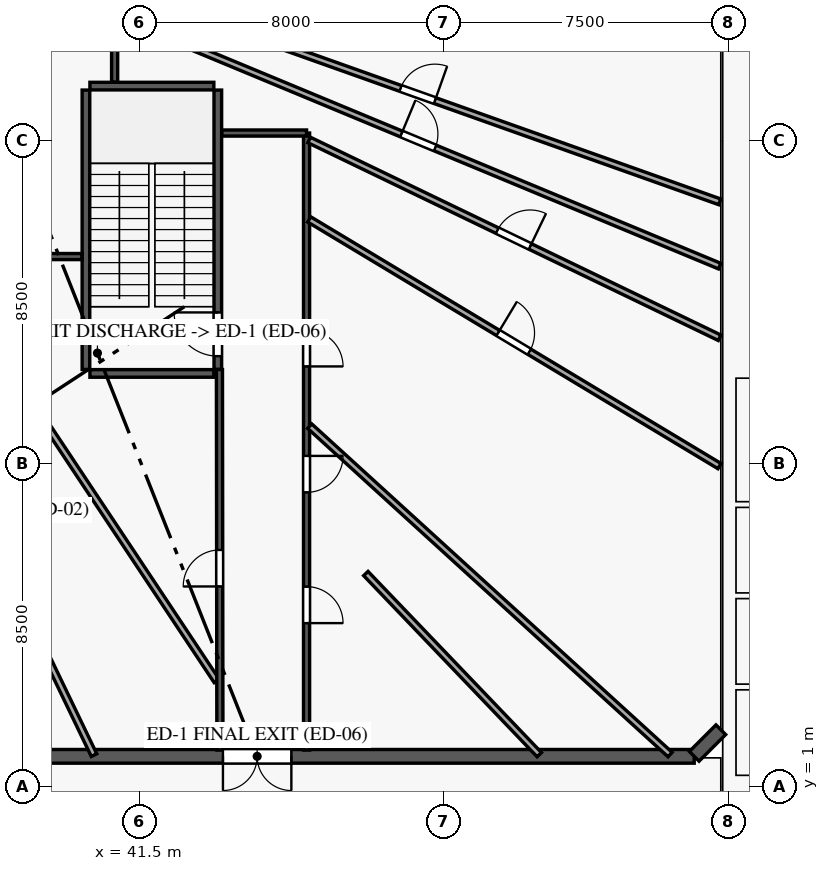
"""IFC4 building model, lengths in metres.
Left out: names, types, materials, properties, quantities, classifications, styles, units other than length and angle.
Written with IfcOpenShell. Run it as: python <this file> out.ifc"""

import sys

from ifc_helpers import new_model, si_unit, direction, frame, frame_2d, origin, origin_with_axes, origin_2d, place, context, subcontext, project, spatial, rectangle, circle, extrude, source, transform, mapped, element, fill, save


model = new_model("IFC4")
c1 = context("Model", 3, precision=1e-05, world=origin(), true_north=direction((0.0, 1.0)))
c2 = subcontext(c1, "Body", "Model", "MODEL_VIEW")
j1 = project(units=[si_unit("LENGTHUNIT", "METRE"), si_unit("PLANEANGLEUNIT", "RADIAN")], contexts=[c1])
p1 = place(None, origin())
s1 = spatial("IfcSite", under=j1, at=p1, CompositionType="ELEMENT")
p2 = place(p1, origin())
s2 = spatial("IfcBuilding", under=s1, at=p2, CompositionType="ELEMENT")
p3 = place(p2, origin())
s3 = spatial("IfcBuildingStorey", under=s2, at=p3, CompositionType="ELEMENT", Elevation=0.0)
m1 = source(origin_with_axes(), c2, "Body", "SweptSolid", [
    extrude(circle(Radius=0.9, at=origin_2d()), origin(), (0.0, 0.0, 1.0), 4.5),
])
p4 = place(p3, frame((46.8, 7.5, 0.0), z_axis=(0.0, 0.0, 1.0), x_axis=(1.0, 0.0, 0.0)))
e1 = element("IfcColumn", 1, at=p4, inside=s3, PredefinedType="COLUMN", context=c2, shape_type="MappedRepresentation", body=[
    mapped(m1, transform((0.0, 0.0, 0.0), scale=1.0)),
])
m2 = source(origin_with_axes(), c2, "Body", "SweptSolid", [
    extrude(rectangle(XDim=0.6, YDim=0.9, at=origin_2d()), origin(), (0.0, 0.0, 1.0), 4.5),
])
for number, where, z_axis, x_axis in (
    (2, (54.8, 10.5, 0.0), (0.0, 0.0, 1.0), (1.0, 0.0, 0.0)),
    (3, (54.8, 18.5, 0.0), (0.0, 0.0, 1.0), (1.0, 0.0, 0.0)),
):
    element("IfcColumn", number, at=place(p3, frame(where, z_axis=z_axis, x_axis=x_axis)), inside=s3, PredefinedType="PILASTER", context=c2, shape_type="MappedRepresentation", body=[
        mapped(m2, transform((0.0, 0.0, 0.0), scale=1.0)),
    ])
p5 = place(p3, frame((56.1, 1.8, 0.0), z_axis=(0.0, 0.0, 1.0), x_axis=(-1.0, 0.0, 0.0)))
e4 = element("IfcWall", 4, at=p5, inside=s3, PredefinedType="SOLIDWALL", context=c2, shape_type="SweptSolid", body=[
    extrude(rectangle(XDim=54.6, YDim=0.36, at=frame_2d((27.3, 0.0))), origin(), (0.0, 0.0, 1.0), 4.2),
])
p6 = place(p5, frame((51.547, 0.0, 0.85)))
e5 = element("IfcOpeningElement", 5, at=p6, cuts=e4, PredefinedType="OPENING", context=c2, shape_type="SweptSolid", body=[
    extrude(rectangle(XDim=1.8, YDim=2.2, at=frame_2d((0.9, 1.1))), frame((0.0, 0.19, 0.0), z_axis=(0.0, -1.0, 0.0), x_axis=(1.0, 0.0, 0.0)), (0.0, 0.0, 1.0), 0.38),
])
p7 = place(p5, frame((47.014, 0.0, 0.85)))
e6 = element("IfcOpeningElement", 6, at=p7, cuts=e4, PredefinedType="OPENING", context=c2, shape_type="SweptSolid", body=[
    extrude(rectangle(XDim=1.8, YDim=2.2, at=frame_2d((0.9, 1.1))), frame((0.0, 0.19, 0.0), z_axis=(0.0, -1.0, 0.0), x_axis=(1.0, 0.0, 0.0)), (0.0, 0.0, 1.0), 0.38),
])
p8 = place(p5, frame((42.49, 0.0, 0.85)))
e7 = element("IfcOpeningElement", 7, at=p8, cuts=e4, PredefinedType="OPENING", context=c2, shape_type="SweptSolid", body=[
    extrude(rectangle(XDim=1.8, YDim=2.2, at=frame_2d((0.9, 1.1))), frame((0.0, 0.19, 0.0), z_axis=(0.0, -1.0, 0.0), x_axis=(1.0, 0.0, 0.0)), (0.0, 0.0, 1.0), 0.38),
])
p9 = place(p5, frame((37.288, 0.0, 0.85)))
e8 = element("IfcOpeningElement", 8, at=p9, cuts=e4, PredefinedType="OPENING", context=c2, shape_type="SweptSolid", body=[
    extrude(rectangle(XDim=1.8, YDim=2.2, at=frame_2d((0.9, 1.1))), frame((0.0, 0.19, 0.0), z_axis=(0.0, -1.0, 0.0), x_axis=(1.0, 0.0, 0.0)), (0.0, 0.0, 1.0), 0.38),
])
p10 = place(p5, frame((25.176, 0.0, 0.85)))
e9 = element("IfcOpeningElement", 9, at=p10, cuts=e4, PredefinedType="OPENING", context=c2, shape_type="SweptSolid", body=[
    extrude(rectangle(XDim=1.8, YDim=2.2, at=frame_2d((0.9, 1.1))), frame((0.0, 0.19, 0.0), z_axis=(0.0, -1.0, 0.0), x_axis=(1.0, 0.0, 0.0)), (0.0, 0.0, 1.0), 0.38),
])
p11 = place(p5, frame((17.162, 0.0, 0.85)))
e10 = element("IfcOpeningElement", 10, at=p11, cuts=e4, PredefinedType="OPENING", context=c2, shape_type="SweptSolid", body=[
    extrude(rectangle(XDim=1.8, YDim=2.2, at=frame_2d((0.9, 1.1))), frame((0.0, 0.19, 0.0), z_axis=(0.0, -1.0, 0.0), x_axis=(1.0, 0.0, 0.0)), (0.0, 0.0, 1.0), 0.38),
])
p12 = place(p5, frame((13.244, 0.0, 0.85)))
e11 = element("IfcOpeningElement", 11, at=p12, cuts=e4, PredefinedType="OPENING", context=c2, shape_type="SweptSolid", body=[
    extrude(rectangle(XDim=1.8, YDim=2.2, at=frame_2d((0.9, 1.1))), frame((0.0, 0.19, 0.0), z_axis=(0.0, -1.0, 0.0), x_axis=(1.0, 0.0, 0.0)), (0.0, 0.0, 1.0), 0.38),
])
p13 = place(p5, frame((6.25, 0.0, 0.85)))
e12 = element("IfcOpeningElement", 12, at=p13, cuts=e4, PredefinedType="OPENING", context=c2, shape_type="SweptSolid", body=[
    extrude(rectangle(XDim=1.8, YDim=2.2, at=frame_2d((0.9, 1.1))), frame((0.0, 0.19, 0.0), z_axis=(0.0, -1.0, 0.0), x_axis=(1.0, 0.0, 0.0)), (0.0, 0.0, 1.0), 0.38),
])
p14 = place(p5, frame((1.48, 0.0, 0.85)))
e13 = element("IfcOpeningElement", 13, at=p14, cuts=e4, PredefinedType="OPENING", context=c2, shape_type="SweptSolid", body=[
    extrude(rectangle(XDim=1.8, YDim=2.2, at=frame_2d((0.9, 1.1))), frame((0.0, 0.19, 0.0), z_axis=(0.0, -1.0, 0.0), x_axis=(1.0, 0.0, 0.0)), (0.0, 0.0, 1.0), 0.38),
])
p15 = place(p5, frame((33.2, 0.0, 0.0)))
e14 = element("IfcOpeningElement", 14, at=p15, cuts=e4, PredefinedType="OPENING", context=c2, shape_type="SweptSolid", body=[
    extrude(rectangle(XDim=1.8, YDim=2.3, at=frame_2d((0.9, 1.15))), frame((0.0, 0.19, 0.0), z_axis=(0.0, -1.0, 0.0), x_axis=(1.0, 0.0, 0.0)), (0.0, 0.0, 1.0), 0.38),
])
p16 = place(p5, frame((30.6, 0.0, 0.0)))
e15 = element("IfcOpeningElement", 15, at=p16, cuts=e4, PredefinedType="OPENING", context=c2, shape_type="SweptSolid", body=[
    extrude(rectangle(XDim=1.8, YDim=2.3, at=frame_2d((0.9, 1.15))), frame((0.0, 0.19, 0.0), z_axis=(0.0, -1.0, 0.0), x_axis=(1.0, 0.0, 0.0)), (0.0, 0.0, 1.0), 0.38),
])
p17 = place(p5, frame((10.6, 0.0, 0.0)))
e16 = element("IfcOpeningElement", 16, at=p17, cuts=e4, PredefinedType="OPENING", context=c2, shape_type="SweptSolid", body=[
    extrude(rectangle(XDim=1.8, YDim=2.3, at=frame_2d((0.9, 1.15))), frame((0.0, 0.19, 0.0), z_axis=(0.0, -1.0, 0.0), x_axis=(1.0, 0.0, 0.0)), (0.0, 0.0, 1.0), 0.38),
])
p18 = place(p3, frame((56.1, 1.8, 0.0), z_axis=(0.0, 0.0, 1.0), x_axis=(0.707106781187, 0.707106781187, 0.0)))
e17 = element("IfcWall", 17, at=p18, inside=s3, PredefinedType="SOLIDWALL", context=c2, shape_type="SweptSolid", body=[
    extrude(rectangle(XDim=0.99, YDim=0.36, at=frame_2d((0.495, 0.0))), origin(), (0.0, 0.0, 1.0), 4.2),
])
p19 = place(p3, frame((40.095, 11.98, 0.0), z_axis=(0.0, 0.0, 1.0), x_axis=(0.0, 1.0, 0.0)))
e18 = element("IfcWall", 18, at=p19, inside=s3, PredefinedType="SHEAR", context=c2, shape_type="SweptSolid", body=[
    extrude(rectangle(XDim=7.35, YDim=0.2, at=frame_2d((3.675, 0.0))), origin(), (0.0, 0.0, 1.0), 4.2),
])
p20 = place(p3, frame((43.565, 11.98, 0.0), z_axis=(0.0, 0.0, 1.0), x_axis=(0.0, 1.0, 0.0)))
e19 = element("IfcWall", 19, at=p20, inside=s3, PredefinedType="SHEAR", context=c2, shape_type="SweptSolid", body=[
    extrude(rectangle(XDim=7.35, YDim=0.2, at=frame_2d((3.675, 0.0))), origin(), (0.0, 0.0, 1.0), 4.2),
])
p21 = place(p20, frame((0.35, 0.0, 0.0)))
e20 = element("IfcOpeningElement", 20, at=p21, cuts=e19, PredefinedType="OPENING", context=c2, shape_type="SweptSolid", body=[
    extrude(rectangle(XDim=1.15, YDim=2.15, at=frame_2d((0.575, 1.075))), frame((0.0, 0.11, 0.0), z_axis=(0.0, -1.0, 0.0), x_axis=(1.0, 0.0, 0.0)), (0.0, 0.0, 1.0), 0.22),
])
for number, where, z_axis, x_axis in (
    (21, (40.2, 11.875, 0.0), (0.0, 0.0, 1.0), (1.0, 0.0, 0.0)),
    (22, (40.2, 19.435, 0.0), (0.0, 0.0, 1.0), (1.0, 0.0, 0.0)),
):
    element("IfcWall", number, at=place(p3, frame(where, z_axis=z_axis, x_axis=x_axis)), inside=s3, PredefinedType="SHEAR", context=c2, shape_type="SweptSolid", body=[
        extrude(rectangle(XDim=3.26, YDim=0.2, at=frame_2d((1.63, 0.0))), origin(), (0.0, 0.0, 1.0), 4.2),
    ])
p22 = place(p3, frame((40.85, 38.05, 0.0), z_axis=(0.0, 0.0, 1.0), x_axis=(0.0, -1.0, 0.0)))
e23 = element("IfcWall", 23, at=p22, inside=s3, PredefinedType="PARTITIONING", context=c2, shape_type="SweptSolid", body=[
    extrude(rectangle(XDim=18.508, YDim=0.16, at=frame_2d((9.254, 0.0))), origin(), (0.0, 0.0, 1.0), 3.25),
])
p23 = place(p22, frame((12.99, 0.0, 0.0)))
e24 = element("IfcOpeningElement", 24, at=p23, cuts=e23, PredefinedType="OPENING", context=c2, shape_type="SweptSolid", body=[
    extrude(rectangle(XDim=0.96, YDim=2.15, at=frame_2d((0.48, 1.075))), frame((0.0, 0.09, 0.0), z_axis=(0.0, -1.0, 0.0), x_axis=(1.0, 0.0, 0.0)), (0.0, 0.0, 1.0), 0.18),
])
p24 = place(p22, frame((11.446, 0.0, 0.0)))
e25 = element("IfcOpeningElement", 25, at=p24, cuts=e23, PredefinedType="OPENING", context=c2, shape_type="SweptSolid", body=[
    extrude(rectangle(XDim=0.96, YDim=2.15, at=frame_2d((0.48, 1.075))), frame((0.0, 0.09, 0.0), z_axis=(0.0, -1.0, 0.0), x_axis=(1.0, 0.0, 0.0)), (0.0, 0.0, 1.0), 0.18),
])
p25 = place(p22, frame((8.695, 0.0, 0.0)))
e26 = element("IfcOpeningElement", 26, at=p25, cuts=e23, PredefinedType="OPENING", context=c2, shape_type="SweptSolid", body=[
    extrude(rectangle(XDim=0.96, YDim=2.15, at=frame_2d((0.48, 1.075))), frame((0.0, 0.09, 0.0), z_axis=(0.0, -1.0, 0.0), x_axis=(1.0, 0.0, 0.0)), (0.0, 0.0, 1.0), 0.18),
])
p26 = place(p22, frame((5.944, 0.0, 0.0)))
e27 = element("IfcOpeningElement", 27, at=p26, cuts=e23, PredefinedType="OPENING", context=c2, shape_type="SweptSolid", body=[
    extrude(rectangle(XDim=0.96, YDim=2.15, at=frame_2d((0.48, 1.075))), frame((0.0, 0.09, 0.0), z_axis=(0.0, -1.0, 0.0), x_axis=(1.0, 0.0, 0.0)), (0.0, 0.0, 1.0), 0.18),
])
p27 = place(p22, frame((2.72, 0.0, 0.0)))
e28 = element("IfcOpeningElement", 28, at=p27, cuts=e23, PredefinedType="OPENING", context=c2, shape_type="SweptSolid", body=[
    extrude(rectangle(XDim=0.96, YDim=2.15, at=frame_2d((0.48, 1.075))), frame((0.0, 0.09, 0.0), z_axis=(0.0, -1.0, 0.0), x_axis=(1.0, 0.0, 0.0)), (0.0, 0.0, 1.0), 0.18),
])
p28 = place(p3, frame((40.932, 21.274, 0.0), z_axis=(0.0, 0.0, 1.0), x_axis=(0.923573591062, -0.383421206889, 0.0)))
e29 = element("IfcWall", 29, at=p28, inside=s3, PredefinedType="PARTITIONING", context=c2, shape_type="SweptSolid", body=[
    extrude(rectangle(XDim=17.149, YDim=0.16, at=frame_2d((8.574, 0.0))), origin(), (0.0, 0.0, 1.0), 4.2),
])
p29 = place(p28, frame((8.082, 0.0, 0.0)))
e30 = element("IfcOpeningElement", 30, at=p29, cuts=e29, PredefinedType="OPENING", context=c2, shape_type="SweptSolid", body=[
    extrude(rectangle(XDim=0.96, YDim=2.15, at=frame_2d((0.48, 1.075))), frame((0.0, 0.09, 0.0), z_axis=(0.0, -1.0, 0.0), x_axis=(1.0, 0.0, 0.0)), (0.0, 0.0, 1.0), 0.18),
])
p30 = place(p3, frame((40.918, 22.024, 0.0), z_axis=(0.0, 0.0, 1.0), x_axis=(0.942274220907, -0.334842190613, 0.0)))
e31 = element("IfcWall", 31, at=p30, inside=s3, PredefinedType="PARTITIONING", context=c2, shape_type="SweptSolid", body=[
    extrude(rectangle(XDim=16.824, YDim=0.16, at=frame_2d((8.412, 0.0))), origin(), (0.0, 0.0, 1.0), 4.2),
])
p31 = place(p30, frame((7.912, 0.0, 0.0)))
e32 = element("IfcOpeningElement", 32, at=p31, cuts=e31, PredefinedType="OPENING", context=c2, shape_type="SweptSolid", body=[
    extrude(rectangle(XDim=0.96, YDim=2.15, at=frame_2d((0.48, 1.075))), frame((0.0, 0.09, 0.0), z_axis=(0.0, -1.0, 0.0), x_axis=(1.0, 0.0, 0.0)), (0.0, 0.0, 1.0), 0.18),
])
p32 = place(p3, frame((45.9, 18.2, 0.0), z_axis=(0.0, 0.0, 1.0), x_axis=(0.0, -1.0, 0.0)))
e33 = element("IfcWall", 33, at=p32, inside=s3, PredefinedType="PARTITIONING", context=c2, shape_type="SweptSolid", body=[
    extrude(rectangle(XDim=16.235, YDim=0.16, at=frame_2d((8.117, 0.0))), origin(), (0.0, 0.0, 1.0), 4.2),
])
p33 = place(p32, frame((11.935, 0.0, 0.0)))
e34 = element("IfcOpeningElement", 34, at=p33, cuts=e33, PredefinedType="OPENING", context=c2, shape_type="SweptSolid", body=[
    extrude(rectangle(XDim=0.96, YDim=2.15, at=frame_2d((0.48, 1.075))), frame((0.0, 0.09, 0.0), z_axis=(0.0, -1.0, 0.0), x_axis=(1.0, 0.0, 0.0)), (0.0, 0.0, 1.0), 0.18),
])
p34 = place(p32, frame((8.495, 0.0, 0.0)))
e35 = element("IfcOpeningElement", 35, at=p34, cuts=e33, PredefinedType="OPENING", context=c2, shape_type="SweptSolid", body=[
    extrude(rectangle(XDim=0.96, YDim=2.15, at=frame_2d((0.48, 1.075))), frame((0.0, 0.09, 0.0), z_axis=(0.0, -1.0, 0.0), x_axis=(1.0, 0.0, 0.0)), (0.0, 0.0, 1.0), 0.18),
])
p35 = place(p32, frame((5.181, 0.0, 0.0)))
e36 = element("IfcOpeningElement", 36, at=p35, cuts=e33, PredefinedType="OPENING", context=c2, shape_type="SweptSolid", body=[
    extrude(rectangle(XDim=0.96, YDim=2.15, at=frame_2d((0.48, 1.075))), frame((0.0, 0.09, 0.0), z_axis=(0.0, -1.0, 0.0), x_axis=(1.0, 0.0, 0.0)), (0.0, 0.0, 1.0), 0.18),
])
p36 = place(p3, frame((34.032, 14.868, 0.0), z_axis=(0.0, 0.0, 1.0), x_axis=(0.433724291506, -0.901045636445, 0.0)))
e37 = element("IfcWall", 37, at=p36, inside=s3, PredefinedType="PARTITIONING", context=c2, shape_type="SweptSolid", body=[
    extrude(rectangle(XDim=14.468, YDim=0.16, at=frame_2d((7.234, 0.0))), origin(), (0.0, 0.0, 1.0), 4.2),
])
p37 = place(p3, frame((39.988, 14.95, 0.0), z_axis=(0.0, 0.0, 1.0), x_axis=(-1.0, 0.0, 0.0)))
e38 = element("IfcWall", 38, at=p37, inside=s3, PredefinedType="PARTITIONING", context=c2, shape_type="SweptSolid", body=[
    extrude(rectangle(XDim=14.388, YDim=0.16, at=frame_2d((7.194, 0.0))), origin(), (0.0, 0.0, 1.0), 4.2),
])
p38 = place(p37, frame((10.19, 0.0, 0.0)))
e39 = element("IfcOpeningElement", 39, at=p38, cuts=e38, PredefinedType="OPENING", context=c2, shape_type="SweptSolid", body=[
    extrude(rectangle(XDim=0.96, YDim=2.15, at=frame_2d((0.48, 1.075))), frame((0.0, 0.09, 0.0), z_axis=(0.0, -1.0, 0.0), x_axis=(1.0, 0.0, 0.0)), (0.0, 0.0, 1.0), 0.18),
])
p39 = place(p37, frame((6.878, 0.0, 0.0)))
e40 = element("IfcOpeningElement", 40, at=p39, cuts=e38, PredefinedType="OPENING", context=c2, shape_type="SweptSolid", body=[
    extrude(rectangle(XDim=0.96, YDim=2.15, at=frame_2d((0.48, 1.075))), frame((0.0, 0.09, 0.0), z_axis=(0.0, -1.0, 0.0), x_axis=(1.0, 0.0, 0.0)), (0.0, 0.0, 1.0), 0.18),
])
p40 = place(p37, frame((4.595, 0.0, 0.0)))
e41 = element("IfcOpeningElement", 41, at=p40, cuts=e38, PredefinedType="OPENING", context=c2, shape_type="SweptSolid", body=[
    extrude(rectangle(XDim=0.96, YDim=2.15, at=frame_2d((0.48, 1.075))), frame((0.0, 0.09, 0.0), z_axis=(0.0, -1.0, 0.0), x_axis=(1.0, 0.0, 0.0)), (0.0, 0.0, 1.0), 0.18),
])
p41 = place(p37, frame((2.312, 0.0, 0.0)))
e42 = element("IfcOpeningElement", 42, at=p41, cuts=e38, PredefinedType="OPENING", context=c2, shape_type="SweptSolid", body=[
    extrude(rectangle(XDim=0.96, YDim=2.15, at=frame_2d((0.48, 1.075))), frame((0.0, 0.09, 0.0), z_axis=(0.0, -1.0, 0.0), x_axis=(1.0, 0.0, 0.0)), (0.0, 0.0, 1.0), 0.18),
])
p42 = place(p3, frame((36.156, 14.881, 0.0), z_axis=(0.0, 0.0, 1.0), x_axis=(0.553761322164, -0.832675445822, 0.0)))
e43 = element("IfcWall", 43, at=p42, inside=s3, PredefinedType="PARTITIONING", context=c2, shape_type="SweptSolid", body=[
    extrude(rectangle(XDim=13.327, YDim=0.16, at=frame_2d((6.664, 0.0))), origin(), (0.0, 0.0, 1.0), 4.2),
])
p43 = place(p3, frame((45.982, 10.488, 0.0), z_axis=(0.0, 0.0, 1.0), x_axis=(0.73914139053, -0.673550298646, 0.0)))
e44 = element("IfcWall", 44, at=p43, inside=s3, PredefinedType="PARTITIONING", context=c2, shape_type="SweptSolid", body=[
    extrude(rectangle(XDim=12.83, YDim=0.16, at=frame_2d((6.415, 0.0))), origin(), (0.0, 0.0, 1.0), 4.2),
])
p44 = place(p3, frame((45.969, 15.927, 0.0), z_axis=(0.0, 0.0, 1.0), x_axis=(0.857034319892, -0.515259327453, 0.0)))
e45 = element("IfcWall", 45, at=p44, inside=s3, PredefinedType="PARTITIONING", context=c2, shape_type="SweptSolid", body=[
    extrude(rectangle(XDim=12.598, YDim=0.16, at=frame_2d((6.299, 0.0))), origin(), (0.0, 0.0, 1.0), 4.2),
])
p45 = place(p44, frame((5.799, 0.0, 0.0)))
e46 = element("IfcOpeningElement", 46, at=p45, cuts=e45, PredefinedType="OPENING", context=c2, shape_type="SweptSolid", body=[
    extrude(rectangle(XDim=0.96, YDim=2.15, at=frame_2d((0.48, 1.075))), frame((0.0, 0.09, 0.0), z_axis=(0.0, -1.0, 0.0), x_axis=(1.0, 0.0, 0.0)), (0.0, 0.0, 1.0), 0.18),
])
p46 = place(p3, frame((45.969, 18.017, 0.0), z_axis=(0.0, 0.0, 1.0), x_axis=(0.900884595161, -0.434058689813, 0.0)))
e47 = element("IfcWall", 47, at=p46, inside=s3, PredefinedType="PARTITIONING", context=c2, shape_type="SweptSolid", body=[
    extrude(rectangle(XDim=11.988, YDim=0.16, at=frame_2d((5.994, 0.0))), origin(), (0.0, 0.0, 1.0), 4.2),
])
p47 = place(p46, frame((5.494, 0.0, 0.0)))
e48 = element("IfcOpeningElement", 48, at=p47, cuts=e47, PredefinedType="OPENING", context=c2, shape_type="SweptSolid", body=[
    extrude(rectangle(XDim=0.96, YDim=2.15, at=frame_2d((0.48, 1.075))), frame((0.0, 0.09, 0.0), z_axis=(0.0, -1.0, 0.0), x_axis=(1.0, 0.0, 0.0)), (0.0, 0.0, 1.0), 0.18),
])
p48 = place(p3, frame((43.62, 1.965, 0.0), z_axis=(0.0, 0.0, 1.0), x_axis=(-0.001219154463, 0.999999256831, 0.0)))
e49 = element("IfcWall", 49, at=p48, inside=s3, PredefinedType="PARTITIONING", context=c2, shape_type="SweptSolid", body=[
    extrude(rectangle(XDim=10.013, YDim=0.16, at=frame_2d((5.006, 0.0))), origin(), (0.0, 0.0, 1.0), 4.2),
])
p49 = place(p48, frame((4.305, 0.0, 0.0)))
e50 = element("IfcOpeningElement", 50, at=p49, cuts=e49, PredefinedType="OPENING", context=c2, shape_type="SweptSolid", body=[
    extrude(rectangle(XDim=0.96, YDim=2.15, at=frame_2d((0.48, 1.075))), frame((0.0, 0.09, 0.0), z_axis=(0.0, -1.0, 0.0), x_axis=(1.0, 0.0, 0.0)), (0.0, 0.0, 1.0), 0.18),
])
p50 = place(p3, frame((47.46, 6.61, 0.0), z_axis=(0.0, 0.0, 1.0), x_axis=(0.69155014519, -0.722328454851, 0.0)))
e51 = element("IfcWall", 51, at=p50, inside=s3, PredefinedType="PARTITIONING", context=c2, shape_type="SweptSolid", body=[
    extrude(rectangle(XDim=6.6, YDim=0.16, at=frame_2d((3.3, 0.0))), origin(), (0.0, 0.0, 1.0), 4.2),
])
p51 = place(p3, frame((43.672, 18.2, 0.0), z_axis=(0.0, 0.0, 1.0), x_axis=(1.0, 0.0, 0.0)))
e52 = element("IfcWall", 52, at=p51, inside=s3, PredefinedType="PARTITIONING", context=c2, shape_type="SweptSolid", body=[
    extrude(rectangle(XDim=2.228, YDim=0.16, at=frame_2d((1.114, 0.0))), origin(), (0.0, 0.0, 1.0), 4.2),
])
m3 = source(origin_with_axes(), c2, "Body", "SweptSolid", [
    extrude(rectangle(XDim=1.8, YDim=2.2, at=frame_2d((0.9, 1.1))), frame((0.0, 0.03, 0.0), z_axis=(0.0, -1.0, 0.0), x_axis=(1.0, 0.0, 0.0)), (0.0, 0.0, 1.0), 0.06),
])
p52 = place(p12, origin())
e53 = element("IfcWindow", 53, at=p52, inside=s3, PartitioningType="SINGLE_PANEL", PredefinedType="WINDOW", context=c2, shape_type="MappedRepresentation", body=[
    mapped(m3, transform((0.0, 0.0, 0.0), scale=1.0)),
])
fill(e11, e53)
p53 = place(p13, origin())
e54 = element("IfcWindow", 54, at=p53, inside=s3, PartitioningType="SINGLE_PANEL", PredefinedType="WINDOW", context=c2, shape_type="MappedRepresentation", body=[
    mapped(m3, transform((0.0, 0.0, 0.0), scale=1.0)),
])
fill(e12, e54)
p54 = place(p14, origin())
e55 = element("IfcWindow", 55, at=p54, inside=s3, PartitioningType="SINGLE_PANEL", PredefinedType="WINDOW", context=c2, shape_type="MappedRepresentation", body=[
    mapped(m3, transform((0.0, 0.0, 0.0), scale=1.0)),
])
fill(e13, e55)
m4 = source(origin_with_axes(), c2, "Body", "SweptSolid", [
    extrude(rectangle(XDim=1.8, YDim=2.3, at=frame_2d((0.9, 1.15))), frame((0.0, 0.025, 0.0), z_axis=(0.0, -1.0, 0.0), x_axis=(1.0, 0.0, 0.0)), (0.0, 0.0, 1.0), 0.05),
])
p55 = place(p17, origin())
e56 = element("IfcDoor", 56, at=p55, inside=s3, OperationType="DOUBLE_DOOR_SINGLE_SWING", PredefinedType="DOOR", context=c2, shape_type="MappedRepresentation", body=[
    mapped(m4, transform((0.0, 0.0, 0.0), scale=1.0)),
])
fill(e16, e56)
m5 = source(origin_with_axes(), c2, "Body", "SweptSolid", [
    extrude(rectangle(XDim=1.15, YDim=2.15, at=frame_2d((0.575, 1.075))), frame((0.0, 0.025, 0.0), z_axis=(0.0, -1.0, 0.0), x_axis=(1.0, 0.0, 0.0)), (0.0, 0.0, 1.0), 0.05),
])
p56 = place(p21, origin())
e57 = element("IfcDoor", 57, at=p56, inside=s3, OperationType="SINGLE_SWING_RIGHT", PredefinedType="DOOR", context=c2, shape_type="MappedRepresentation", body=[
    mapped(m5, transform((0.0, 0.0, 0.0), scale=1.0)),
])
fill(e20, e57)
m6 = source(origin_with_axes(), c2, "Body", "SweptSolid", [
    extrude(rectangle(XDim=0.96, YDim=2.15, at=frame_2d((0.48, 1.075))), frame((0.0, 0.025, 0.0), z_axis=(0.0, -1.0, 0.0), x_axis=(1.0, 0.0, 0.0)), (0.0, 0.0, 1.0), 0.05),
])
p57 = place(p49, origin())
e58 = element("IfcDoor", 58, at=p57, inside=s3, OperationType="SINGLE_SWING_LEFT", PredefinedType="DOOR", context=c2, shape_type="MappedRepresentation", body=[
    mapped(m6, transform((0.0, 0.0, 0.0), scale=1.0)),
])
fill(e50, e58)
p58 = place(p33, origin())
e59 = element("IfcDoor", 59, at=p58, inside=s3, OperationType="SINGLE_SWING_RIGHT", PredefinedType="DOOR", context=c2, shape_type="MappedRepresentation", body=[
    mapped(m6, transform((0.0, 0.0, 0.0), scale=1.0)),
])
fill(e34, e59)
p59 = place(p34, origin())
e60 = element("IfcDoor", 60, at=p59, inside=s3, OperationType="SINGLE_SWING_LEFT", PredefinedType="DOOR", context=c2, shape_type="MappedRepresentation", body=[
    mapped(m6, transform((0.0, 0.0, 0.0), scale=1.0)),
])
fill(e35, e60)
p60 = place(p35, origin())
e61 = element("IfcDoor", 61, at=p60, inside=s3, OperationType="SINGLE_SWING_RIGHT", PredefinedType="DOOR", context=c2, shape_type="MappedRepresentation", body=[
    mapped(m6, transform((0.0, 0.0, 0.0), scale=1.0)),
])
fill(e36, e61)
p61 = place(p45, origin())
e62 = element("IfcDoor", 62, at=p61, inside=s3, OperationType="SINGLE_SWING_LEFT", PredefinedType="DOOR", context=c2, shape_type="MappedRepresentation", body=[
    mapped(m6, transform((0.0, 0.0, 0.0), scale=1.0)),
])
fill(e46, e62)
p62 = place(p47, origin())
e63 = element("IfcDoor", 63, at=p62, inside=s3, OperationType="SINGLE_SWING_RIGHT", PredefinedType="DOOR", context=c2, shape_type="MappedRepresentation", body=[
    mapped(m6, transform((0.0, 0.0, 0.0), scale=1.0)),
])
fill(e48, e63)
p63 = place(p29, origin())
e64 = element("IfcDoor", 64, at=p63, inside=s3, OperationType="SINGLE_SWING_LEFT", PredefinedType="DOOR", context=c2, shape_type="MappedRepresentation", body=[
    mapped(m6, transform((0.0, 0.0, 0.0), scale=1.0)),
])
fill(e30, e64)
p64 = place(p31, origin())
e65 = element("IfcDoor", 65, at=p64, inside=s3, OperationType="SINGLE_SWING_RIGHT", PredefinedType="DOOR", context=c2, shape_type="MappedRepresentation", body=[
    mapped(m6, transform((0.0, 0.0, 0.0), scale=1.0)),
])
fill(e32, e65)
save(model, sys.argv[1])
